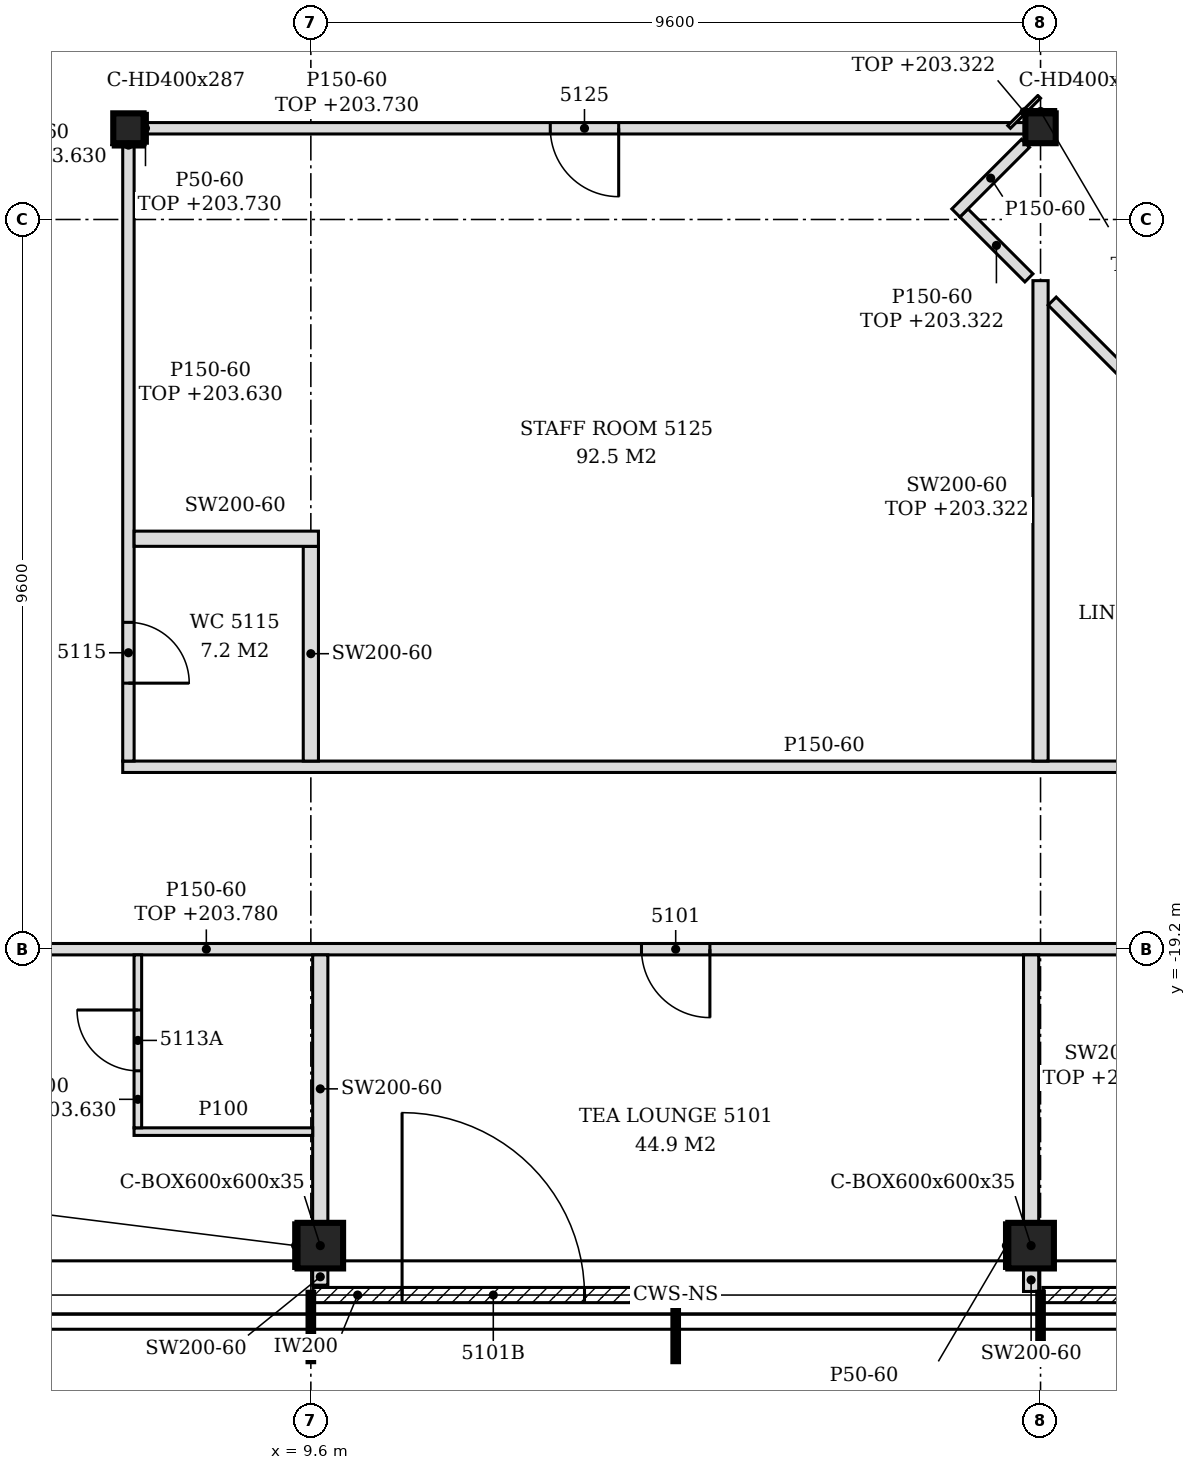
"""IFC4 building model, lengths in metres.
Left out: names, types, materials, properties, quantities, classifications, styles, units other than length and angle.
Written with IfcOpenShell. Run it as: python <this file> out.ifc"""

import sys

from ifc_helpers import new_model, si_unit, direction, frame, frame_2d, origin, origin_2d, place, context, subcontext, project, spatial, polyline, rectangle, hollow_rectangle, i_section, outline, extrude, clip, halfspace, element, fill, save


model = new_model("IFC4")
c1 = context("Model", 3, precision=1e-05, world=origin(), true_north=direction((0.0, 1.0)))
c2 = subcontext(c1, "Body", "Model", "MODEL_VIEW")
j1 = project(units=[si_unit("LENGTHUNIT", "METRE"), si_unit("PLANEANGLEUNIT", "RADIAN")], contexts=[c1])
p1 = place(None, origin())
s1 = spatial("IfcSite", under=j1, at=p1, CompositionType="ELEMENT")
p2 = place(p1, origin())
s2 = spatial("IfcBuilding", under=s1, at=p2, CompositionType="ELEMENT")
p3 = place(p2, frame((0.0, 0.0, 201.0)))
s3 = spatial("IfcBuildingStorey", under=s2, at=p3, CompositionType="ELEMENT", Elevation=201.0)
for number, where, z_axis, x_axis in (
    (1, (9.724, -23.1, -0.15), (0.0, 0.0, 1.0), (1.0, 0.0, 0.0)),
    (2, (19.076, -23.1, -0.15), (0.0, 0.0, 1.0), (1.0, 0.0, 0.0)),
):
    element("IfcColumn", number, at=place(p3, frame(where, z_axis=z_axis, x_axis=x_axis)), inside=s3, PredefinedType="COLUMN", context=c2, shape_type="Clipping", body=[
        clip(clip(extrude(hollow_rectangle(XDim=0.6, YDim=0.6, WallThickness=0.035, at=origin_2d()), origin(), (0.0, 0.0, 1.0), 3.5), halfspace(frame((0.0, 0.0, 0.011), z_axis=(0.0, 0.0, 1.0), x_axis=(1.0, 0.0, 0.0)), True)), halfspace(frame((0.0, 0.0, 3.095), z_axis=(0.0, 0.0, 1.0), x_axis=(1.0, 0.0, 0.0)), False)),
    ])
for number, where, z_axis, x_axis in (
    (3, (7.2, -8.4, -0.15), (0.0, 0.0, 1.0), (1.0, 0.0, 0.0)),
    (4, (19.2, -8.4, -0.15), (0.0, 0.0, 1.0), (1.0, 0.0, 0.0)),
):
    element("IfcColumn", number, at=place(p3, frame(where, z_axis=z_axis, x_axis=x_axis)), inside=s3, PredefinedType="COLUMN", context=c2, shape_type="SweptSolid", body=[
        extrude(i_section(OverallWidth=0.399, OverallDepth=0.393, WebThickness=0.023, FlangeThickness=0.037, FilletRadius=0.015, at=origin_2d()), origin(), (0.0, 0.0, 1.0), 3.5),
    ])
p4 = place(p3, frame((9.63, -23.75, 0.0), z_axis=(0.0, 0.0, 1.0), x_axis=(1.0, 0.0, 0.0)))
e5 = element("IfcWall", 5, at=p4, inside=s3, PredefinedType="NOTDEFINED", context=c2, shape_type="SweptSolid", body=[
    extrude(rectangle(XDim=4.74, YDim=0.2, at=frame_2d((2.37, 0.0))), origin(), (0.0, 0.0, 1.0), 3.35),
])
p5 = place(p4, frame((1.17, 0.0, 0.0)))
e6 = element("IfcOpeningElement", 6, at=p5, cuts=e5, PredefinedType="OPENING", context=c2, shape_type="SweptSolid", body=[
    extrude(rectangle(XDim=2.4, YDim=2.4, at=frame_2d((1.2, 1.2))), frame((0.0, 0.11, 0.0), z_axis=(0.0, -1.0, 0.0), x_axis=(1.0, 0.0, 0.0)), (0.0, 0.0, 1.0), 0.22),
])
p6 = place(p3, frame((19.23, -23.75, 0.0), z_axis=(0.0, 0.0, 1.0), x_axis=(1.0, 0.0, 0.0)))
e7 = element("IfcWall", 7, at=p6, inside=s3, PredefinedType="NOTDEFINED", context=c2, shape_type="SweptSolid", body=[
    extrude(rectangle(XDim=4.74, YDim=0.2, at=frame_2d((2.37, 0.0))), origin(), (0.0, 0.0, 1.0), 3.35),
])
p7 = place(p6, frame((1.17, 0.0, 0.0)))
e8 = element("IfcOpeningElement", 8, at=p7, cuts=e7, PredefinedType="OPENING", context=c2, shape_type="SweptSolid", body=[
    extrude(rectangle(XDim=2.4, YDim=2.4, at=frame_2d((1.2, 1.2))), frame((0.0, 0.11, 0.0), z_axis=(0.0, -1.0, 0.0), x_axis=(1.0, 0.0, 0.0)), (0.0, 0.0, 1.0), 0.22),
])
p8 = place(p3, frame((19.076, -23.703, 0.0), z_axis=(0.0, 0.0, 1.0), x_axis=(0.0, 1.0, 0.0)))
e9 = element("IfcWall", 9, at=p8, inside=s3, PredefinedType="PARTITIONING", context=c2, shape_type="SweptSolid", body=[
    extrude(outline(polyline([(0.0, 0.0), (0.303, 0.0), (0.303, 2.43), (0.153, 2.43), (0.151, 3.35), (0.0, 3.35), (0.0, 0.0)])), frame((0.0, 0.1, 0.0), z_axis=(0.0, -1.0, 0.0), x_axis=(1.0, 0.0, 0.0)), (0.0, 0.0, 1.0), 0.2),
])
p9 = place(p3, frame((9.724, -23.62, 0.0), z_axis=(0.0, 0.0, 1.0), x_axis=(0.0, 1.0, 0.0)))
e10 = element("IfcWall", 10, at=p9, inside=s3, PredefinedType="PARTITIONING", context=c2, shape_type="SweptSolid", body=[
    extrude(outline(polyline([(0.0, 0.0), (0.22, 0.0), (0.22, 2.43), (0.07, 2.43), (0.068, 3.35), (0.0, 3.35), (0.0, 0.0)])), frame((0.0, 0.1, 0.0), z_axis=(0.0, -1.0, 0.0), x_axis=(1.0, 0.0, 0.0)), (0.0, 0.0, 1.0), 0.2),
])
p10 = place(p3, frame((9.724, -22.8, 0.0), z_axis=(0.0, 0.0, 1.0), x_axis=(0.0, 1.0, 0.0)))
e11 = element("IfcWall", 11, at=p10, inside=s3, PredefinedType="PARTITIONING", context=c2, shape_type="SweptSolid", body=[
    extrude(outline(polyline([(0.0, 0.0), (3.525, 0.0), (3.525, 2.78), (3.495, 2.78), (3.493, 3.35), (0.15, 3.35), (0.148, 2.43), (0.0, 2.43), (0.0, 0.0)])), frame((0.0, 0.1, 0.0), z_axis=(0.0, -1.0, 0.0), x_axis=(1.0, 0.0, 0.0)), (0.0, 0.0, 1.0), 0.2),
])
p11 = place(p3, frame((19.076, -22.8, 0.0), z_axis=(0.0, 0.0, 1.0), x_axis=(0.0, 1.0, 0.0)))
e12 = element("IfcWall", 12, at=p11, inside=s3, PredefinedType="PARTITIONING", context=c2, shape_type="SweptSolid", body=[
    extrude(rectangle(XDim=3.525, YDim=0.2, at=frame_2d((1.763, 0.0))), origin(), (0.0, 0.0, 1.0), 2.322),
])
p12 = place(p3, frame((7.274, -21.6, 0.0), z_axis=(0.0, 0.0, 1.0), x_axis=(1.0, 0.0, 0.0)))
e13 = element("IfcWall", 13, at=p12, inside=s3, PredefinedType="PARTITIONING", context=c2, shape_type="SweptSolid", body=[
    extrude(outline(polyline([(0.0, 0.0), (2.35, 0.0), (2.35, 3.35), (0.076, 3.35), (0.074, 2.63), (0.0, 2.63), (0.0, 0.0)])), frame((0.0, 0.05, 0.0), z_axis=(0.0, -1.0, 0.0), x_axis=(1.0, 0.0, 0.0)), (0.0, 0.0, 1.0), 0.1),
])
p13 = place(p3, frame((7.324, -21.55, 0.0), z_axis=(0.0, 0.0, 1.0), x_axis=(0.0, 1.0, 0.0)))
e14 = element("IfcWall", 14, at=p13, inside=s3, PredefinedType="PARTITIONING", context=c2, shape_type="SweptSolid", body=[
    extrude(rectangle(XDim=2.275, YDim=0.1, at=frame_2d((1.138, 0.0))), origin(), (0.0, 0.0, 1.0), 2.63),
])
p14 = place(p13, frame((0.75, 0.0, 0.0)))
e15 = element("IfcOpeningElement", 15, at=p14, cuts=e14, PredefinedType="OPENING", context=c2, shape_type="SweptSolid", body=[
    extrude(rectangle(XDim=0.8, YDim=2.1, at=frame_2d((0.4, 1.05))), frame((0.0, 0.06, 0.0), z_axis=(0.0, -1.0, 0.0), x_axis=(1.0, 0.0, 0.0)), (0.0, 0.0, 1.0), 0.12),
])
p15 = place(p3, frame((2.5, -19.2, 0.0), z_axis=(0.0, 0.0, 1.0), x_axis=(1.0, 0.0, 0.0)))
e16 = element("IfcWall", 16, at=p15, inside=s3, PredefinedType="PARTITIONING", context=c2, shape_type="SweptSolid", body=[
    extrude(outline(polyline([(0.0, 0.0), (24.418, 0.0), (24.418, 2.78), (16.851, 2.78), (16.849, 2.322), (16.549, 2.322), (16.547, 2.78), (4.85, 2.78), (4.848, 2.63), (4.55, 2.63), (4.548, 2.78), (0.0, 2.78), (0.0, 0.0)])), frame((0.0, 0.075, 0.0), z_axis=(0.0, -1.0, 0.0), x_axis=(1.0, 0.0, 0.0)), (0.0, 0.0, 1.0), 0.15),
])
p16 = place(p15, frame((11.45, 0.0, 0.0)))
e17 = element("IfcOpeningElement", 17, at=p16, cuts=e16, PredefinedType="OPENING", context=c2, shape_type="SweptSolid", body=[
    extrude(rectangle(XDim=0.9, YDim=2.1, at=frame_2d((0.45, 1.05))), frame((0.0, 0.085, 0.0), z_axis=(0.0, -1.0, 0.0), x_axis=(1.0, 0.0, 0.0)), (0.0, 0.0, 1.0), 0.17),
])
p17 = place(p15, frame((18.794, 0.0, 0.0)))
e18 = element("IfcOpeningElement", 18, at=p17, cuts=e16, PredefinedType="OPENING", context=c2, shape_type="SweptSolid", body=[
    extrude(rectangle(XDim=0.9, YDim=2.1, at=frame_2d((0.45, 1.05))), frame((0.0, 0.085, 0.0), z_axis=(0.0, -1.0, 0.0), x_axis=(1.0, 0.0, 0.0)), (0.0, 0.0, 1.0), 0.17),
])
p18 = place(p3, frame((7.125, -16.8, 0.0), z_axis=(0.0, 0.0, 1.0), x_axis=(1.0, 0.0, 0.0)))
e19 = element("IfcWall", 19, at=p18, inside=s3, PredefinedType="PARTITIONING", context=c2, shape_type="SweptSolid", body=[
    extrude(outline(polyline([(0.0, 0.0), (18.46, 0.0), (18.46, 3.35), (12.226, 3.35), (12.224, 2.322), (11.924, 2.322), (11.922, 3.35), (0.225, 3.35), (0.223, 2.63), (0.0, 2.63), (0.0, 0.0)])), frame((0.0, 0.075, 0.0), z_axis=(0.0, -1.0, 0.0), x_axis=(1.0, 0.0, 0.0)), (0.0, 0.0, 1.0), 0.15),
])
p19 = place(p3, frame((7.2, -16.725, 0.0), z_axis=(0.0, 0.0, 1.0), x_axis=(0.0, 1.0, 0.0)))
e20 = element("IfcWall", 20, at=p19, inside=s3, PredefinedType="PARTITIONING", context=c2, shape_type="SweptSolid", body=[
    extrude(rectangle(XDim=8.129, YDim=0.15, at=frame_2d((4.064, 0.0))), origin(), (0.0, 0.0, 1.0), 2.63),
])
p20 = place(p19, frame((1.025, 0.0, 0.0)))
e21 = element("IfcOpeningElement", 21, at=p20, cuts=e20, PredefinedType="OPENING", context=c2, shape_type="SweptSolid", body=[
    extrude(rectangle(XDim=0.8, YDim=2.1, at=frame_2d((0.4, 1.05))), frame((0.0, 0.085, 0.0), z_axis=(0.0, -1.0, 0.0), x_axis=(1.0, 0.0, 0.0)), (0.0, 0.0, 1.0), 0.17),
])
p21 = place(p3, frame((9.6, -16.725, 0.0), z_axis=(0.0, 0.0, 1.0), x_axis=(0.0, 1.0, 0.0)))
e22 = element("IfcWall", 22, at=p21, inside=s3, PredefinedType="PARTITIONING", context=c2, shape_type="SweptSolid", body=[
    extrude(outline(polyline([(0.0, 0.0), (2.825, 0.0), (2.825, 3.35), (2.43, 3.35), (2.428, 2.78), (2.22, 2.78), (2.218, 3.35), (0.0, 3.35), (0.0, 0.0)])), frame((0.0, 0.1, 0.0), z_axis=(0.0, -1.0, 0.0), x_axis=(1.0, 0.0, 0.0)), (0.0, 0.0, 1.0), 0.2),
])
p22 = place(p3, frame((19.2, -16.725, 0.0), z_axis=(0.0, 0.0, 1.0), x_axis=(0.0, 1.0, 0.0)))
e23 = element("IfcWall", 23, at=p22, inside=s3, PredefinedType="PARTITIONING", context=c2, shape_type="SweptSolid", body=[
    extrude(rectangle(XDim=6.321, YDim=0.2, at=frame_2d((3.16, 0.0))), origin(), (0.0, 0.0, 1.0), 2.322),
])
p23 = place(p3, frame((25.351, -16.672, 0.0), z_axis=(0.0, 0.0, 1.0), x_axis=(-0.707106781187, 0.707106781187, 0.0)))
e24 = element("IfcWall", 24, at=p23, inside=s3, PredefinedType="PARTITIONING", context=c2, shape_type="SweptSolid", body=[
    extrude(rectangle(XDim=8.482, YDim=0.15, at=frame_2d((4.241, 0.0))), origin(), (0.0, 0.0, 1.0), 2.322),
])
p24 = place(p23, frame((3.809, 0.0, 0.0)))
e25 = element("IfcOpeningElement", 25, at=p24, cuts=e24, PredefinedType="OPENING", context=c2, shape_type="SweptSolid", body=[
    extrude(rectangle(XDim=0.9, YDim=2.1, at=frame_2d((0.45, 1.05))), frame((0.0, 0.085, 0.0), z_axis=(0.0, -1.0, 0.0), x_axis=(1.0, 0.0, 0.0)), (0.0, 0.0, 1.0), 0.17),
])
p25 = place(p3, frame((7.275, -13.8, 0.0), z_axis=(0.0, 0.0, 1.0), x_axis=(1.0, 0.0, 0.0)))
e26 = element("IfcWall", 26, at=p25, inside=s3, PredefinedType="PARTITIONING", context=c2, shape_type="SweptSolid", body=[
    extrude(outline(polyline([(0.0, 0.0), (2.425, 0.0), (2.425, 3.35), (0.075, 3.35), (0.073, 2.63), (0.0, 2.63), (0.0, 0.0)])), frame((0.0, 0.1, 0.0), z_axis=(0.0, -1.0, 0.0), x_axis=(1.0, 0.0, 0.0)), (0.0, 0.0, 1.0), 0.2),
])
p26 = place(p3, frame((19.047, -10.368, 0.0), z_axis=(0.0, 0.0, 1.0), x_axis=(-0.707409718716, 0.706803713817, 0.0)))
e27 = element("IfcWall", 27, at=p26, inside=s3, PredefinedType="PARTITIONING", context=c2, shape_type="SweptSolid", body=[
    extrude(rectangle(XDim=1.208, YDim=0.15, at=frame_2d((0.604, 0.0))), origin(), (0.0, 0.0, 1.0), 2.322),
])
p27 = place(p3, frame((18.086, -9.514, 0.0), z_axis=(0.0, 0.0, 1.0), x_axis=(0.707106781187, 0.707106781187, 0.0)))
e28 = element("IfcWall", 28, at=p27, inside=s3, PredefinedType="PARTITIONING", context=c2, shape_type="SweptSolid", body=[
    extrude(rectangle(XDim=1.295, YDim=0.15, at=frame_2d((0.648, 0.0))), origin(), (0.0, 0.0, 1.0), 3.35),
])
p28 = place(p3, frame((7.399, -8.4, 0.0), z_axis=(0.0, 0.0, 1.0), x_axis=(1.0, 0.0, 0.0)))
e29 = element("IfcWall", 29, at=p28, inside=s3, PredefinedType="PARTITIONING", context=c2, shape_type="SweptSolid", body=[
    extrude(rectangle(XDim=11.601, YDim=0.15, at=frame_2d((5.801, 0.0))), origin(), (0.0, 0.0, 1.0), 2.73),
])
p29 = place(p28, frame((5.351, 0.0, 0.0)))
e30 = element("IfcOpeningElement", 30, at=p29, cuts=e29, PredefinedType="OPENING", context=c2, shape_type="SweptSolid", body=[
    extrude(rectangle(XDim=0.9, YDim=2.1, at=frame_2d((0.45, 1.05))), frame((0.0, 0.085, 0.0), z_axis=(0.0, -1.0, 0.0), x_axis=(1.0, 0.0, 0.0)), (0.0, 0.0, 1.0), 0.17),
])
for number, where, z_axis, x_axis in (
    (31, (18.751, -23.4, 0.0), (0.0, 0.0, 1.0), (0.0, 1.0, 0.0)),
    (32, (9.399, -23.4, 0.0), (0.0, 0.0, 1.0), (0.0, 1.0, 0.0)),
):
    element("IfcWall", number, at=place(p3, frame(where, z_axis=z_axis, x_axis=x_axis)), inside=s3, PredefinedType="PARTITIONING", context=c2, shape_type="SweptSolid", body=[
        extrude(rectangle(XDim=0.6, YDim=0.05, at=frame_2d((0.3, 0.0))), origin(), (0.0, 0.0, 1.0), 2.43),
    ])
p30 = place(p3, frame((7.425, -8.596, 0.0), z_axis=(0.0, 0.0, 1.0), x_axis=(0.0, 1.0, 0.0)))
e33 = element("IfcWall", 33, at=p30, inside=s3, PredefinedType="PARTITIONING", context=c2, shape_type="SweptSolid", body=[
    extrude(rectangle(XDim=0.393, YDim=0.05, at=frame_2d((0.196, 0.0))), origin(), (0.0, 0.0, 1.0), 2.73),
])
p31 = place(p3, frame((18.786, -8.382, 0.0), z_axis=(0.0, 0.0, 1.0), x_axis=(0.707106781187, 0.707106781187, 0.0)))
e34 = element("IfcWall", 34, at=p31, inside=s3, PredefinedType="PARTITIONING", context=c2, shape_type="SweptSolid", body=[
    extrude(rectangle(XDim=0.56, YDim=0.05, at=frame_2d((0.28, 0.0))), origin(), (0.0, 0.0, 1.0), 2.322),
])
p32 = place(p3, frame((7.0, -8.622, 0.0), z_axis=(0.0, 0.0, 1.0), x_axis=(1.0, 0.0, 0.0)))
e35 = element("IfcWall", 35, at=p32, inside=s3, PredefinedType="PARTITIONING", context=c2, shape_type="SweptSolid", body=[
    extrude(rectangle(XDim=0.399, YDim=0.05, at=frame_2d((0.199, 0.0))), origin(), (0.0, 0.0, 1.0), 2.63),
])
p33 = place(p3, frame((19.0, -8.178, 0.0), z_axis=(0.0, 0.0, 1.0), x_axis=(1.0, 0.0, 0.0)))
e36 = element("IfcWall", 36, at=p33, inside=s3, PredefinedType="PARTITIONING", context=c2, shape_type="SweptSolid", body=[
    extrude(rectangle(XDim=0.399, YDim=0.05, at=frame_2d((0.199, 0.0))), origin(), (0.0, 0.0, 1.0), 2.322),
])
p34 = place(p5, origin())
e37 = element("IfcDoor", 37, at=p34, inside=s3, OperationType="SINGLE_SWING_LEFT", PredefinedType="DOOR", context=c2, shape_type="SweptSolid", body=[
    extrude(rectangle(XDim=2.4, YDim=2.4, at=frame_2d((1.2, 1.2))), frame((0.0, 0.025, 0.0), z_axis=(0.0, -1.0, 0.0), x_axis=(1.0, 0.0, 0.0)), (0.0, 0.0, 1.0), 0.05),
])
fill(e6, e37)
p35 = place(p16, frame((0.9, 0.0, 0.0), z_axis=(0.0, 0.0, 1.0), x_axis=(-1.0, 0.0, 0.0)))
e38 = element("IfcDoor", 38, at=p35, inside=s3, OperationType="SINGLE_SWING_LEFT", PredefinedType="DOOR", context=c2, shape_type="SweptSolid", body=[
    extrude(rectangle(XDim=0.9, YDim=2.1, at=frame_2d((0.45, 1.05))), frame((0.0, 0.025, 0.0), z_axis=(0.0, -1.0, 0.0), x_axis=(1.0, 0.0, 0.0)), (0.0, 0.0, 1.0), 0.05),
])
fill(e17, e38)
p36 = place(p14, origin())
e39 = element("IfcDoor", 39, at=p36, inside=s3, OperationType="SINGLE_SWING_RIGHT", PredefinedType="DOOR", context=c2, shape_type="SweptSolid", body=[
    extrude(rectangle(XDim=0.8, YDim=2.1, at=frame_2d((0.4, 1.05))), frame((0.0, 0.025, 0.0), z_axis=(0.0, -1.0, 0.0), x_axis=(1.0, 0.0, 0.0)), (0.0, 0.0, 1.0), 0.05),
])
fill(e15, e39)
p37 = place(p20, frame((0.8, 0.0, 0.0), z_axis=(0.0, 0.0, 1.0), x_axis=(-1.0, 0.0, 0.0)))
e40 = element("IfcDoor", 40, at=p37, inside=s3, OperationType="SINGLE_SWING_RIGHT", PredefinedType="DOOR", context=c2, shape_type="SweptSolid", body=[
    extrude(rectangle(XDim=0.8, YDim=2.1, at=frame_2d((0.4, 1.05))), frame((0.0, 0.025, 0.0), z_axis=(0.0, -1.0, 0.0), x_axis=(1.0, 0.0, 0.0)), (0.0, 0.0, 1.0), 0.05),
])
fill(e21, e40)
p38 = place(p29, frame((0.9, 0.0, 0.0), z_axis=(0.0, 0.0, 1.0), x_axis=(-1.0, 0.0, 0.0)))
e41 = element("IfcDoor", 41, at=p38, inside=s3, OperationType="SINGLE_SWING_LEFT", PredefinedType="DOOR", context=c2, shape_type="SweptSolid", body=[
    extrude(rectangle(XDim=0.9, YDim=2.1, at=frame_2d((0.45, 1.05))), frame((0.0, 0.025, 0.0), z_axis=(0.0, -1.0, 0.0), x_axis=(1.0, 0.0, 0.0)), (0.0, 0.0, 1.0), 0.05),
])
fill(e30, e41)
save(model, sys.argv[1])
